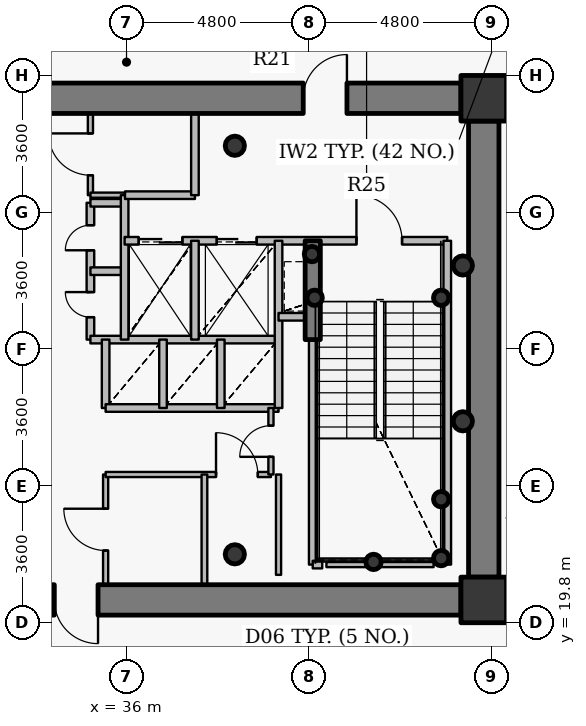
"""IFC4 building model, lengths in metres.
Left out: names, types, materials, properties, quantities, classifications, styles, units other than length and angle.
Written with IfcOpenShell. Run it as: python <this file> out.ifc"""

import sys

from ifc_helpers import new_model, si_unit, direction, frame, frame_2d, origin, origin_2d, place, context, subcontext, project, spatial, rectangle, hollow_circle, extrude, source, transform, mapped, element, fill, save


model = new_model("IFC4")
c1 = context("Model", 3, precision=1e-05, world=origin(), true_north=direction((0.0, 1.0)))
c2 = subcontext(c1, "Body", "Model", "MODEL_VIEW")
j1 = project(units=[si_unit("LENGTHUNIT", "METRE"), si_unit("PLANEANGLEUNIT", "RADIAN")], contexts=[c1])
p1 = place(None, origin())
s1 = spatial("IfcSite", under=j1, at=p1, CompositionType="ELEMENT")
p2 = place(p1, origin())
s2 = spatial("IfcBuilding", under=s1, at=p2, CompositionType="ELEMENT")
p3 = place(p2, frame((0.0, 0.0, 193.65)))
s3 = spatial("IfcBuildingStorey", under=s2, at=p3, CompositionType="ELEMENT", Elevation=193.65)
for number, where, z_axis, x_axis in (
    (1, (45.4, 20.4, 0.0), (0.0, 0.0, 1.0), (1.0, 0.0, 0.0)),
    (2, (45.4, 33.6, 0.0), (0.0, 0.0, 1.0), (1.0, 0.0, 0.0)),
):
    element("IfcColumn", number, at=place(p3, frame(where, z_axis=z_axis, x_axis=x_axis)), inside=s3, PredefinedType="COLUMN", context=c2, shape_type="SweptSolid", body=[
        extrude(rectangle(XDim=1.2, YDim=1.2, at=origin_2d()), origin(), (0.0, 0.0, 1.0), 3.75),
    ])
for number, where, z_axis, x_axis in (
    (3, (38.85, 21.6, 0.0), (0.0, 0.0, 1.0), (1.0, 0.0, 0.0)),
    (4, (38.85, 32.35, 0.0), (0.0, 0.0, 1.0), (1.0, 0.0, 0.0)),
):
    element("IfcColumn", number, at=place(p3, frame(where, z_axis=z_axis, x_axis=x_axis)), inside=s3, PredefinedType="COLUMN", context=c2, shape_type="SweptSolid", body=[
        extrude(hollow_circle(Radius=0.254, WallThickness=0.02, at=origin_2d()), origin(), (0.0, 0.0, 1.0), 3.75),
    ])
for number, where, z_axis, x_axis in (
    (5, (44.28, 21.5, 0.0), (0.0, 0.0, 1.0), (1.0, 0.0, 0.0)),
    (6, (44.28, 23.05, 0.0), (0.0, 0.0, 1.0), (1.0, 0.0, 0.0)),
    (7, (42.5, 21.4, 0.0), (0.0, 0.0, 1.0), (1.0, 0.0, 0.0)),
    (8, (40.95, 28.35, 0.0), (0.0, 0.0, 1.0), (1.0, 0.0, 0.0)),
    (9, (44.28, 28.35, 0.0), (0.0, 0.0, 1.0), (1.0, 0.0, 0.0)),
    (10, (40.88, 29.5, 0.0), (0.0, 0.0, 1.0), (1.0, 0.0, 0.0)),
):
    element("IfcColumn", number, at=place(p3, frame(where, z_axis=z_axis, x_axis=x_axis)), inside=s3, PredefinedType="COLUMN", context=c2, shape_type="SweptSolid", body=[
        extrude(hollow_circle(Radius=0.203, WallThickness=0.016, at=origin_2d()), origin(), (0.0, 0.0, 1.0), 3.75),
    ])
p4 = place(p3, frame((27.2, 33.6, 0.0), z_axis=(0.0, 0.0, 1.0), x_axis=(1.0, 0.0, 0.0)))
e11 = element("IfcWall", 11, at=p4, inside=s3, PredefinedType="SHEAR", context=c2, shape_type="SweptSolid", body=[
    extrude(rectangle(XDim=17.6, YDim=0.8, at=frame_2d((8.8, 0.0))), origin(), (0.0, 0.0, 1.0), 2.95),
])
p5 = place(p4, frame((13.45, 0.0, 0.0)))
e12 = element("IfcOpeningElement", 12, at=p5, cuts=e11, PredefinedType="OPENING", context=c2, shape_type="SweptSolid", body=[
    extrude(rectangle(XDim=1.15, YDim=2.15, at=origin_2d()), frame((0.575, 0.41, 1.075), z_axis=(0.0, -1.0, 0.0), x_axis=(1.0, 0.0, 0.0)), (0.0, 0.0, 1.0), 0.82),
])
p6 = place(p3, frame((45.4, 33.0, 0.0), z_axis=(0.0, 0.0, 1.0), x_axis=(0.0, -1.0, 0.0)))
e13 = element("IfcWall", 13, at=p6, inside=s3, PredefinedType="SHEAR", context=c2, shape_type="SweptSolid", body=[
    extrude(rectangle(XDim=12.0, YDim=0.8, at=frame_2d((6.0, 0.0))), origin(), (0.0, 0.0, 1.0), 2.95),
])
p7 = place(p3, frame((44.8, 20.4, 0.0), z_axis=(0.0, 0.0, 1.0), x_axis=(-1.0, 0.0, 0.0)))
e14 = element("IfcWall", 14, at=p7, inside=s3, PredefinedType="SHEAR", context=c2, shape_type="SweptSolid", body=[
    extrude(rectangle(XDim=17.6, YDim=0.8, at=frame_2d((8.8, 0.0))), origin(), (0.0, 0.0, 1.0), 2.95),
])
p8 = place(p7, frame((9.55, 0.0, 0.0)))
e15 = element("IfcOpeningElement", 15, at=p8, cuts=e14, PredefinedType="OPENING", context=c2, shape_type="SweptSolid", body=[
    extrude(rectangle(XDim=1.15, YDim=2.15, at=origin_2d()), frame((0.575, 0.41, 1.075), z_axis=(0.0, -1.0, 0.0), x_axis=(1.0, 0.0, 0.0)), (0.0, 0.0, 1.0), 0.82),
])
p9 = place(p3, frame((40.9, 27.25, 0.0), z_axis=(0.0, 0.0, 1.0), x_axis=(0.0, 1.0, 0.0)))
e16 = element("IfcWall", 16, at=p9, inside=s3, PredefinedType="SHEAR", context=c2, shape_type="SweptSolid", body=[
    extrude(rectangle(XDim=2.6, YDim=0.4, at=frame_2d((1.3, 0.0))), origin(), (0.0, 0.0, 1.0), 3.1),
])
for number, where, z_axis, x_axis in (
    (17, (44.85, 25.1, 0.0), (0.0, 0.0, 1.0), (1.0, 0.0, 0.0)),
    (18, (44.85, 29.2, 0.0), (0.0, 0.0, 1.0), (1.0, 0.0, 0.0)),
):
    element("IfcColumn", number, at=place(p3, frame(where, z_axis=z_axis, x_axis=x_axis)), inside=s3, PredefinedType="COLUMN", context=c2, shape_type="SweptSolid", body=[
        extrude(hollow_circle(Radius=0.254, WallThickness=0.02, at=origin_2d()), origin(), (0.0, 0.0, 1.0), 3.75),
    ])
p10 = place(p3, frame((35.05, 27.25, 0.0), z_axis=(0.0, 0.0, 1.0), x_axis=(0.0, 1.0, 0.0)))
e19 = element("IfcWall", 19, at=p10, inside=s3, PredefinedType="PARTITIONING", context=c2, shape_type="SweptSolid", body=[
    extrude(rectangle(XDim=3.6, YDim=0.2, at=frame_2d((1.8, 0.0))), origin(), (0.0, 0.0, 1.0), 3.5),
])
p11 = place(p10, frame((0.59, 0.0, 0.0)))
e20 = element("IfcOpeningElement", 20, at=p11, cuts=e19, PredefinedType="OPENING", context=c2, shape_type="SweptSolid", body=[
    extrude(rectangle(XDim=0.66, YDim=2.05, at=origin_2d()), frame((0.33, 0.11, 1.025), z_axis=(0.0, -1.0, 0.0), x_axis=(1.0, 0.0, 0.0)), (0.0, 0.0, 1.0), 0.22),
])
p12 = place(p10, frame((2.35, 0.0, 0.0)))
e21 = element("IfcOpeningElement", 21, at=p12, cuts=e19, PredefinedType="OPENING", context=c2, shape_type="SweptSolid", body=[
    extrude(rectangle(XDim=0.66, YDim=2.05, at=origin_2d()), frame((0.33, 0.11, 1.025), z_axis=(0.0, -1.0, 0.0), x_axis=(1.0, 0.0, 0.0)), (0.0, 0.0, 1.0), 0.22),
])
p13 = place(p3, frame((35.05, 27.25, 0.0), z_axis=(0.0, 0.0, 1.0), x_axis=(1.0, 0.0, 0.0)))
e22 = element("IfcWall", 22, at=p13, inside=s3, PredefinedType="PARTITIONING", context=c2, shape_type="SweptSolid", body=[
    extrude(rectangle(XDim=4.95, YDim=0.2, at=frame_2d((2.475, 0.0))), origin(), (0.0, 0.0, 1.0), 3.085),
])
for number, where, z_axis, x_axis in (
    (23, (35.05, 29.05, 0.0), (0.0, 0.0, 1.0), (1.0, 0.0, 0.0)),
    (24, (35.05, 30.85, 0.0), (0.0, 0.0, 1.0), (1.0, 0.0, 0.0)),
):
    element("IfcWall", number, at=place(p3, frame(where, z_axis=z_axis, x_axis=x_axis)), inside=s3, PredefinedType="PARTITIONING", context=c2, shape_type="SweptSolid", body=[
        extrude(rectangle(XDim=0.9, YDim=0.2, at=frame_2d((0.45, 0.0))), origin(), (0.0, 0.0, 1.0), 3.5),
    ])
p14 = place(p3, frame((35.05, 31.05, 0.0), z_axis=(0.0, 0.0, 1.0), x_axis=(0.0, 1.0, 0.0)))
e25 = element("IfcWall", 25, at=p14, inside=s3, PredefinedType="PARTITIONING", context=c2, shape_type="SweptSolid", body=[
    extrude(rectangle(XDim=2.15, YDim=0.135, at=frame_2d((1.075, 0.0))), origin(), (0.0, 0.0, 1.0), 3.085),
])
p15 = place(p14, frame((0.525, 0.0, 0.0)))
e26 = element("IfcOpeningElement", 26, at=p15, cuts=e25, PredefinedType="OPENING", context=c2, shape_type="SweptSolid", body=[
    extrude(rectangle(XDim=1.1, YDim=2.15, at=origin_2d()), frame((0.55, 0.078, 1.075), z_axis=(0.0, -1.0, 0.0), x_axis=(1.0, 0.0, 0.0)), (0.0, 0.0, 1.0), 0.155),
])
p16 = place(p3, frame((35.05, 31.05, 0.0), z_axis=(0.0, 0.0, 1.0), x_axis=(1.0, 0.0, 0.0)))
e27 = element("IfcWall", 27, at=p16, inside=s3, PredefinedType="PARTITIONING", context=c2, shape_type="SweptSolid", body=[
    extrude(rectangle(XDim=0.9, YDim=0.135, at=frame_2d((0.45, 0.0))), origin(), (0.0, 0.0, 1.0), 3.5),
])
p17 = place(p3, frame((35.45, 20.8, 0.0), z_axis=(0.0, 0.0, 1.0), x_axis=(0.0, 1.0, 0.0)))
e28 = element("IfcWall", 28, at=p17, inside=s3, PredefinedType="PARTITIONING", context=c2, shape_type="SweptSolid", body=[
    extrude(rectangle(XDim=2.9, YDim=0.135, at=frame_2d((1.45, 0.0))), origin(), (0.0, 0.0, 1.0), 3.085),
])
p18 = place(p17, frame((0.9, 0.0, 0.0)))
e29 = element("IfcOpeningElement", 29, at=p18, cuts=e28, PredefinedType="OPENING", context=c2, shape_type="SweptSolid", body=[
    extrude(rectangle(XDim=1.1, YDim=2.15, at=origin_2d()), frame((0.55, 0.078, 1.075), z_axis=(0.0, -1.0, 0.0), x_axis=(1.0, 0.0, 0.0)), (0.0, 0.0, 1.0), 0.155),
])
p19 = place(p3, frame((35.45, 23.7, 0.0), z_axis=(0.0, 0.0, 1.0), x_axis=(1.0, 0.0, 0.0)))
e30 = element("IfcWall", 30, at=p19, inside=s3, PredefinedType="PARTITIONING", context=c2, shape_type="SweptSolid", body=[
    extrude(rectangle(XDim=4.35, YDim=0.135, at=frame_2d((2.175, 0.0))), origin(), (0.0, 0.0, 1.0), 3.085),
])
p20 = place(p19, frame((2.905, 0.0, 0.0)))
e31 = element("IfcOpeningElement", 31, at=p20, cuts=e30, PredefinedType="OPENING", context=c2, shape_type="SweptSolid", body=[
    extrude(rectangle(XDim=1.1, YDim=2.15, at=origin_2d()), frame((0.55, 0.078, 1.075), z_axis=(0.0, -1.0, 0.0), x_axis=(1.0, 0.0, 0.0)), (0.0, 0.0, 1.0), 0.155),
])
p21 = place(p3, frame((35.45, 25.45, 0.0), z_axis=(0.0, 0.0, 1.0), x_axis=(0.0, 1.0, 0.0)))
e32 = element("IfcWall", 32, at=p21, inside=s3, PredefinedType="PARTITIONING", context=c2, shape_type="SweptSolid", body=[
    extrude(rectangle(XDim=1.8, YDim=0.2, at=frame_2d((0.9, 0.0))), origin(), (0.0, 0.0, 1.0), 3.5),
])
p22 = place(p3, frame((35.45, 25.45, 0.0), z_axis=(0.0, 0.0, 1.0), x_axis=(1.0, 0.0, 0.0)))
e33 = element("IfcWall", 33, at=p22, inside=s3, PredefinedType="PARTITIONING", context=c2, shape_type="SweptSolid", body=[
    extrude(rectangle(XDim=4.55, YDim=0.2, at=frame_2d((2.275, 0.0))), origin(), (0.0, 0.0, 1.0), 3.085),
])
p23 = place(p3, frame((35.95, 27.25, 0.0), z_axis=(0.0, 0.0, 1.0), x_axis=(0.0, 1.0, 0.0)))
e34 = element("IfcWall", 34, at=p23, inside=s3, PredefinedType="PARTITIONING", context=c2, shape_type="SweptSolid", body=[
    extrude(rectangle(XDim=3.8, YDim=0.2, at=frame_2d((1.9, 0.0))), origin(), (0.0, 0.0, 1.0), 3.5),
])
p24 = place(p3, frame((35.95, 29.85, 0.0), z_axis=(0.0, 0.0, 1.0), x_axis=(1.0, 0.0, 0.0)))
e35 = element("IfcWall", 35, at=p24, inside=s3, PredefinedType="PARTITIONING", context=c2, shape_type="SweptSolid", body=[
    extrude(rectangle(XDim=8.49, YDim=0.2, at=frame_2d((4.245, 0.0))), origin(), (0.0, 0.0, 1.0), 3.085),
])
p25 = place(p24, frame((6.1, 0.0, 0.0)))
e36 = element("IfcOpeningElement", 36, at=p25, cuts=e35, PredefinedType="OPENING", context=c2, shape_type="SweptSolid", body=[
    extrude(rectangle(XDim=1.2, YDim=2.15, at=origin_2d()), frame((0.6, 0.11, 1.075), z_axis=(0.0, -1.0, 0.0), x_axis=(1.0, 0.0, 0.0)), (0.0, 0.0, 1.0), 0.22),
])
p26 = place(p24, frame((0.37, 0.0, 0.0)))
e37 = element("IfcOpeningElement", 37, at=p26, cuts=e35, PredefinedType="OPENING", context=c2, shape_type="SweptSolid", body=[
    extrude(rectangle(XDim=1.15, YDim=2.15, at=origin_2d()), frame((0.575, 0.11, 1.075), z_axis=(0.0, -1.0, 0.0), x_axis=(1.0, 0.0, 0.0)), (0.0, 0.0, 1.0), 0.22),
])
p27 = place(p24, frame((2.425, 0.0, 0.0)))
e38 = element("IfcOpeningElement", 38, at=p27, cuts=e35, PredefinedType="OPENING", context=c2, shape_type="SweptSolid", body=[
    extrude(rectangle(XDim=1.05, YDim=2.15, at=origin_2d()), frame((0.525, 0.11, 1.075), z_axis=(0.0, -1.0, 0.0), x_axis=(1.0, 0.0, 0.0)), (0.0, 0.0, 1.0), 0.22),
])
p28 = place(p3, frame((35.96, 31.05, 0.0), z_axis=(0.0, 0.0, 1.0), x_axis=(1.0, 0.0, 0.0)))
e39 = element("IfcWall", 39, at=p28, inside=s3, PredefinedType="PARTITIONING", context=c2, shape_type="SweptSolid", body=[
    extrude(rectangle(XDim=1.84, YDim=0.2, at=frame_2d((0.92, 0.0))), origin(), (0.0, 0.0, 1.0), 3.5),
])
p29 = place(p3, frame((36.96, 25.45, 0.0), z_axis=(0.0, 0.0, 1.0), x_axis=(0.0, 1.0, 0.0)))
e40 = element("IfcWall", 40, at=p29, inside=s3, PredefinedType="PARTITIONING", context=c2, shape_type="SweptSolid", body=[
    extrude(rectangle(XDim=1.8, YDim=0.2, at=frame_2d((0.9, 0.0))), origin(), (0.0, 0.0, 1.0), 3.5),
])
p30 = place(p3, frame((37.8, 27.25, 0.0), z_axis=(0.0, 0.0, 1.0), x_axis=(0.0, 1.0, 0.0)))
e41 = element("IfcWall", 41, at=p30, inside=s3, PredefinedType="PARTITIONING", context=c2, shape_type="SweptSolid", body=[
    extrude(rectangle(XDim=2.6, YDim=0.2, at=frame_2d((1.3, 0.0))), origin(), (0.0, 0.0, 1.0), 3.5),
])
p31 = place(p3, frame((37.8, 31.05, 0.0), z_axis=(0.0, 0.0, 1.0), x_axis=(0.0, 1.0, 0.0)))
e42 = element("IfcWall", 42, at=p31, inside=s3, PredefinedType="PARTITIONING", context=c2, shape_type="SweptSolid", body=[
    extrude(rectangle(XDim=2.15, YDim=0.2, at=frame_2d((1.075, 0.0))), origin(), (0.0, 0.0, 1.0), 3.085),
])
p32 = place(p3, frame((38.05, 20.18, 0.0), z_axis=(0.0, 0.0, 1.0), x_axis=(0.0, 1.0, 0.0)))
e43 = element("IfcWall", 43, at=p32, inside=s3, PredefinedType="PARTITIONING", context=c2, shape_type="SweptSolid", body=[
    extrude(rectangle(XDim=3.52, YDim=0.15, at=frame_2d((1.76, 0.0))), origin(), (0.0, 0.0, 1.0), 2.935),
])
p33 = place(p3, frame((38.48, 25.45, 0.0), z_axis=(0.0, 0.0, 1.0), x_axis=(0.0, 1.0, 0.0)))
e44 = element("IfcWall", 44, at=p33, inside=s3, PredefinedType="PARTITIONING", context=c2, shape_type="SweptSolid", body=[
    extrude(rectangle(XDim=1.8, YDim=0.2, at=frame_2d((0.9, 0.0))), origin(), (0.0, 0.0, 1.0), 3.5),
])
p34 = place(p3, frame((39.8, 23.7, 0.0), z_axis=(0.0, 0.0, 1.0), x_axis=(0.0, 1.0, 0.0)))
e45 = element("IfcWall", 45, at=p34, inside=s3, PredefinedType="PARTITIONING", context=c2, shape_type="SweptSolid", body=[
    extrude(rectangle(XDim=1.75, YDim=0.135, at=frame_2d((0.875, 0.0))), origin(), (0.0, 0.0, 1.0), 3.5),
])
p35 = place(p34, frame((0.465, 0.0, 0.0)))
e46 = element("IfcOpeningElement", 46, at=p35, cuts=e45, PredefinedType="OPENING", context=c2, shape_type="SweptSolid", body=[
    extrude(rectangle(XDim=0.82, YDim=2.1, at=origin_2d()), frame((0.41, 0.078, 1.05), z_axis=(0.0, -1.0, 0.0), x_axis=(1.0, 0.0, 0.0)), (0.0, 0.0, 1.0), 0.155),
])
p36 = place(p3, frame((40.0, 25.45, 0.0), z_axis=(0.0, 0.0, 1.0), x_axis=(0.0, 1.0, 0.0)))
e47 = element("IfcWall", 47, at=p36, inside=s3, PredefinedType="PARTITIONING", context=c2, shape_type="SweptSolid", body=[
    extrude(rectangle(XDim=4.4, YDim=0.2, at=frame_2d((2.2, 0.0))), origin(), (0.0, 0.0, 1.0), 3.5),
])
p37 = place(p3, frame((40.0, 27.85, 0.0), z_axis=(0.0, 0.0, 1.0), x_axis=(1.0, 0.0, 0.0)))
e48 = element("IfcWall", 48, at=p37, inside=s3, PredefinedType="PARTITIONING", context=c2, shape_type="SweptSolid", body=[
    extrude(rectangle(XDim=0.9, YDim=0.2, at=frame_2d((0.45, 0.0))), origin(), (0.0, 0.0, 1.0), 3.5),
])
p38 = place(p3, frame((40.9, 21.33, 0.0), z_axis=(0.0, 0.0, 1.0), x_axis=(0.0, 1.0, 0.0)))
e49 = element("IfcWall", 49, at=p38, inside=s3, PredefinedType="PARTITIONING", context=c2, shape_type="SweptSolid", body=[
    extrude(rectangle(XDim=5.91, YDim=0.2, at=frame_2d((2.955, 0.0))), origin(), (0.0, 0.0, 1.0), 3.035),
])
p39 = place(p3, frame((40.9, 21.33, 0.0), z_axis=(0.0, 0.0, 1.0), x_axis=(1.0, 0.0, 0.0)))
e50 = element("IfcWall", 50, at=p39, inside=s3, PredefinedType="PARTITIONING", context=c2, shape_type="SweptSolid", body=[
    extrude(rectangle(XDim=0.25, YDim=0.2, at=frame_2d((0.125, 0.0))), origin(), (0.0, 0.0, 1.0), 3.035),
])
p40 = place(p3, frame((44.44, 21.33, 0.0), z_axis=(0.0, 0.0, 1.0), x_axis=(0.0, 1.0, 0.0)))
e51 = element("IfcWall", 51, at=p40, inside=s3, PredefinedType="PARTITIONING", context=c2, shape_type="SweptSolid", body=[
    extrude(rectangle(XDim=8.52, YDim=0.2, at=frame_2d((4.26, 0.0))), origin(), (0.0, 0.0, 1.0), 3.5),
])
p41 = place(p3, frame((45.8, 20.05, 0.0), z_axis=(0.0, 0.0, 1.0), x_axis=(1.0, 0.0, 0.0)))
e52 = element("IfcWall", 52, at=p41, inside=s3, PredefinedType="PARTITIONING", context=c2, shape_type="SweptSolid", body=[
    extrude(rectangle(XDim=2.4, YDim=0.135, at=frame_2d((1.2, 0.0))), origin(), (0.0, 0.0, 1.0), 3.5),
])
p42 = place(p3, frame((45.8, 33.95, 0.0), z_axis=(0.0, 0.0, 1.0), x_axis=(1.0, 0.0, 0.0)))
e53 = element("IfcWall", 53, at=p42, inside=s3, PredefinedType="PARTITIONING", context=c2, shape_type="SweptSolid", body=[
    extrude(rectangle(XDim=9.197, YDim=0.135, at=frame_2d((4.599, 0.0))), origin(), (0.0, 0.0, 1.0), 3.5),
])
p43 = place(p3, frame((44.08, 21.33, 0.0), z_axis=(0.0, 0.0, 1.0), x_axis=(-1.0, 0.0, 0.0)))
e54 = element("IfcWall", 54, at=p43, inside=s3, PredefinedType="PARTITIONING", context=c2, shape_type="SweptSolid", body=[
    extrude(rectangle(XDim=2.82, YDim=0.135, at=frame_2d((1.41, 0.0))), origin(), (0.0, 0.0, 1.0), 3.035),
])
p44 = place(p3, frame((40.0, 23.7, 0.0), z_axis=(0.0, 0.0, 1.0), x_axis=(0.0, -1.0, 0.0)))
e55 = element("IfcWall", 55, at=p44, inside=s3, PredefinedType="PARTITIONING", context=c2, shape_type="SweptSolid", body=[
    extrude(rectangle(XDim=2.64, YDim=0.135, at=frame_2d((1.32, 0.0))), origin(), (0.0, 0.0, 1.0), 3.035),
])
for number, where, z_axis, x_axis in (
    (56, (45.79, 34.0, 0.0), (0.0, 0.0, 1.0), (-1.0, 0.0, 0.0)),
    (57, (44.81, 20.0, 0.0), (0.0, 0.0, 1.0), (1.0, 0.0, 0.0)),
):
    element("IfcWall", number, at=place(p3, frame(where, z_axis=z_axis, x_axis=x_axis)), inside=s3, PredefinedType="PARTITIONING", context=c2, shape_type="SweptSolid", body=[
        extrude(rectangle(XDim=0.98, YDim=0.135, at=frame_2d((0.49, 0.0))), origin(), (0.0, 0.0, 1.0), 2.935),
    ])
for number, where, z_axis, x_axis in (
    (58, (45.8, 33.01, 0.0), (0.0, 0.0, 1.0), (0.0, 1.0, 0.0)),
    (59, (45.8, 20.377, 0.0), (0.0, 0.0, 1.0), (0.0, 1.0, 0.0)),
):
    element("IfcWall", number, at=place(p3, frame(where, z_axis=z_axis, x_axis=x_axis)), inside=s3, PredefinedType="PARTITIONING", context=c2, shape_type="SweptSolid", body=[
        extrude(rectangle(XDim=0.613, YDim=0.135, at=frame_2d((0.306, 0.0))), origin(), (0.0, 0.0, 1.0), 3.5),
    ])
m1 = source(origin(), c2, "Body", "SweptSolid", [
    extrude(rectangle(XDim=1.15, YDim=2.15, at=origin_2d()), frame((0.575, 0.025, 1.075), z_axis=(0.0, -1.0, 0.0), x_axis=(1.0, 0.0, 0.0)), (0.0, 0.0, 1.0), 0.05),
])
p45 = place(p5, origin())
e60 = element("IfcDoor", 60, at=p45, inside=s3, OperationType="SINGLE_SWING_RIGHT", PredefinedType="DOOR", context=c2, shape_type="MappedRepresentation", body=[
    mapped(m1, transform((0.0, 0.0, 0.0), x_axis=(1.0, 0.0, 0.0), y_axis=(0.0, 1.0, 0.0), z_axis=(0.0, 0.0, 1.0), scale=1.0)),
])
fill(e12, e60)
p46 = place(p8, origin())
e61 = element("IfcDoor", 61, at=p46, inside=s3, OperationType="SINGLE_SWING_LEFT", PredefinedType="DOOR", context=c2, shape_type="MappedRepresentation", body=[
    mapped(m1, transform((0.0, 0.0, 0.0), x_axis=(1.0, 0.0, 0.0), y_axis=(0.0, 1.0, 0.0), z_axis=(0.0, 0.0, 1.0), scale=1.0)),
])
fill(e15, e61)
m2 = source(origin(), c2, "Body", "SweptSolid", [
    extrude(rectangle(XDim=1.2, YDim=2.15, at=origin_2d()), frame((0.6, 0.025, 1.075), z_axis=(0.0, -1.0, 0.0), x_axis=(1.0, 0.0, 0.0)), (0.0, 0.0, 1.0), 0.05),
])
p47 = place(p25, origin())
e62 = element("IfcDoor", 62, at=p47, inside=s3, OperationType="SINGLE_SWING_LEFT", PredefinedType="DOOR", context=c2, shape_type="MappedRepresentation", body=[
    mapped(m2, transform((0.0, 0.0, 0.0), x_axis=(1.0, 0.0, 0.0), y_axis=(0.0, 1.0, 0.0), z_axis=(0.0, 0.0, 1.0), scale=1.0)),
])
fill(e36, e62)
m3 = source(origin(), c2, "Body", "SweptSolid", [
    extrude(rectangle(XDim=1.15, YDim=2.15, at=origin_2d()), frame((0.575, 0.025, 1.075), z_axis=(0.0, -1.0, 0.0), x_axis=(1.0, 0.0, 0.0)), (0.0, 0.0, 1.0), 0.05),
])
p48 = place(p26, origin())
e63 = element("IfcDoor", 63, at=p48, inside=s3, OperationType="DOUBLE_DOOR_SLIDING", PredefinedType="USERDEFINED", context=c2, shape_type="MappedRepresentation", body=[
    mapped(m3, transform((0.0, 0.0, 0.0), x_axis=(1.0, 0.0, 0.0), y_axis=(0.0, 1.0, 0.0), z_axis=(0.0, 0.0, 1.0), scale=1.0)),
])
fill(e37, e63)
m4 = source(origin(), c2, "Body", "SweptSolid", [
    extrude(rectangle(XDim=1.05, YDim=2.15, at=origin_2d()), frame((0.525, 0.025, 1.075), z_axis=(0.0, -1.0, 0.0), x_axis=(1.0, 0.0, 0.0)), (0.0, 0.0, 1.0), 0.05),
])
p49 = place(p27, origin())
e64 = element("IfcDoor", 64, at=p49, inside=s3, OperationType="DOUBLE_DOOR_SLIDING", PredefinedType="USERDEFINED", context=c2, shape_type="MappedRepresentation", body=[
    mapped(m4, transform((0.0, 0.0, 0.0), x_axis=(1.0, 0.0, 0.0), y_axis=(0.0, 1.0, 0.0), z_axis=(0.0, 0.0, 1.0), scale=1.0)),
])
fill(e38, e64)
m5 = source(origin(), c2, "Body", "SweptSolid", [
    extrude(rectangle(XDim=0.66, YDim=2.05, at=origin_2d()), frame((0.33, 0.025, 1.025), z_axis=(0.0, -1.0, 0.0), x_axis=(1.0, 0.0, 0.0)), (0.0, 0.0, 1.0), 0.05),
])
p50 = place(p11, origin())
e65 = element("IfcDoor", 65, at=p50, inside=s3, OperationType="SINGLE_SWING_RIGHT", PredefinedType="USERDEFINED", context=c2, shape_type="MappedRepresentation", body=[
    mapped(m5, transform((0.0, 0.0, 0.0), x_axis=(1.0, 0.0, 0.0), y_axis=(0.0, 1.0, 0.0), z_axis=(0.0, 0.0, 1.0), scale=1.0)),
])
fill(e20, e65)
p51 = place(p12, origin())
e66 = element("IfcDoor", 66, at=p51, inside=s3, OperationType="SINGLE_SWING_LEFT", PredefinedType="USERDEFINED", context=c2, shape_type="MappedRepresentation", body=[
    mapped(m5, transform((0.0, 0.0, 0.0), x_axis=(1.0, 0.0, 0.0), y_axis=(0.0, 1.0, 0.0), z_axis=(0.0, 0.0, 1.0), scale=1.0)),
])
fill(e21, e66)
m6 = source(origin(), c2, "Body", "SweptSolid", [
    extrude(rectangle(XDim=1.1, YDim=2.15, at=origin_2d()), frame((0.55, 0.025, 1.075), z_axis=(0.0, -1.0, 0.0), x_axis=(1.0, 0.0, 0.0)), (0.0, 0.0, 1.0), 0.05),
])
p52 = place(p18, origin())
e67 = element("IfcDoor", 67, at=p52, inside=s3, OperationType="SINGLE_SWING_RIGHT", PredefinedType="DOOR", context=c2, shape_type="MappedRepresentation", body=[
    mapped(m6, transform((0.0, 0.0, 0.0), x_axis=(1.0, 0.0, 0.0), y_axis=(0.0, 1.0, 0.0), z_axis=(0.0, 0.0, 1.0), scale=1.0)),
])
fill(e29, e67)
p53 = place(p20, origin())
e68 = element("IfcDoor", 68, at=p53, inside=s3, OperationType="SINGLE_SWING_LEFT", PredefinedType="DOOR", context=c2, shape_type="MappedRepresentation", body=[
    mapped(m6, transform((0.0, 0.0, 0.0), x_axis=(1.0, 0.0, 0.0), y_axis=(0.0, 1.0, 0.0), z_axis=(0.0, 0.0, 1.0), scale=1.0)),
])
fill(e31, e68)
p54 = place(p15, origin())
e69 = element("IfcDoor", 69, at=p54, inside=s3, OperationType="SINGLE_SWING_RIGHT", PredefinedType="DOOR", context=c2, shape_type="MappedRepresentation", body=[
    mapped(m6, transform((0.0, 0.0, 0.0), x_axis=(1.0, 0.0, 0.0), y_axis=(0.0, 1.0, 0.0), z_axis=(0.0, 0.0, 1.0), scale=1.0)),
])
fill(e26, e69)
m7 = source(origin(), c2, "Body", "SweptSolid", [
    extrude(rectangle(XDim=0.82, YDim=2.1, at=origin_2d()), frame((0.41, 0.025, 1.05), z_axis=(0.0, -1.0, 0.0), x_axis=(1.0, 0.0, 0.0)), (0.0, 0.0, 1.0), 0.05),
])
p55 = place(p35, origin())
e70 = element("IfcDoor", 70, at=p55, inside=s3, OperationType="SINGLE_SWING_LEFT", PredefinedType="DOOR", context=c2, shape_type="MappedRepresentation", body=[
    mapped(m7, transform((0.0, 0.0, 0.0), x_axis=(1.0, 0.0, 0.0), y_axis=(0.0, 1.0, 0.0), z_axis=(0.0, 0.0, 1.0), scale=1.0)),
])
fill(e46, e70)
save(model, sys.argv[1])
